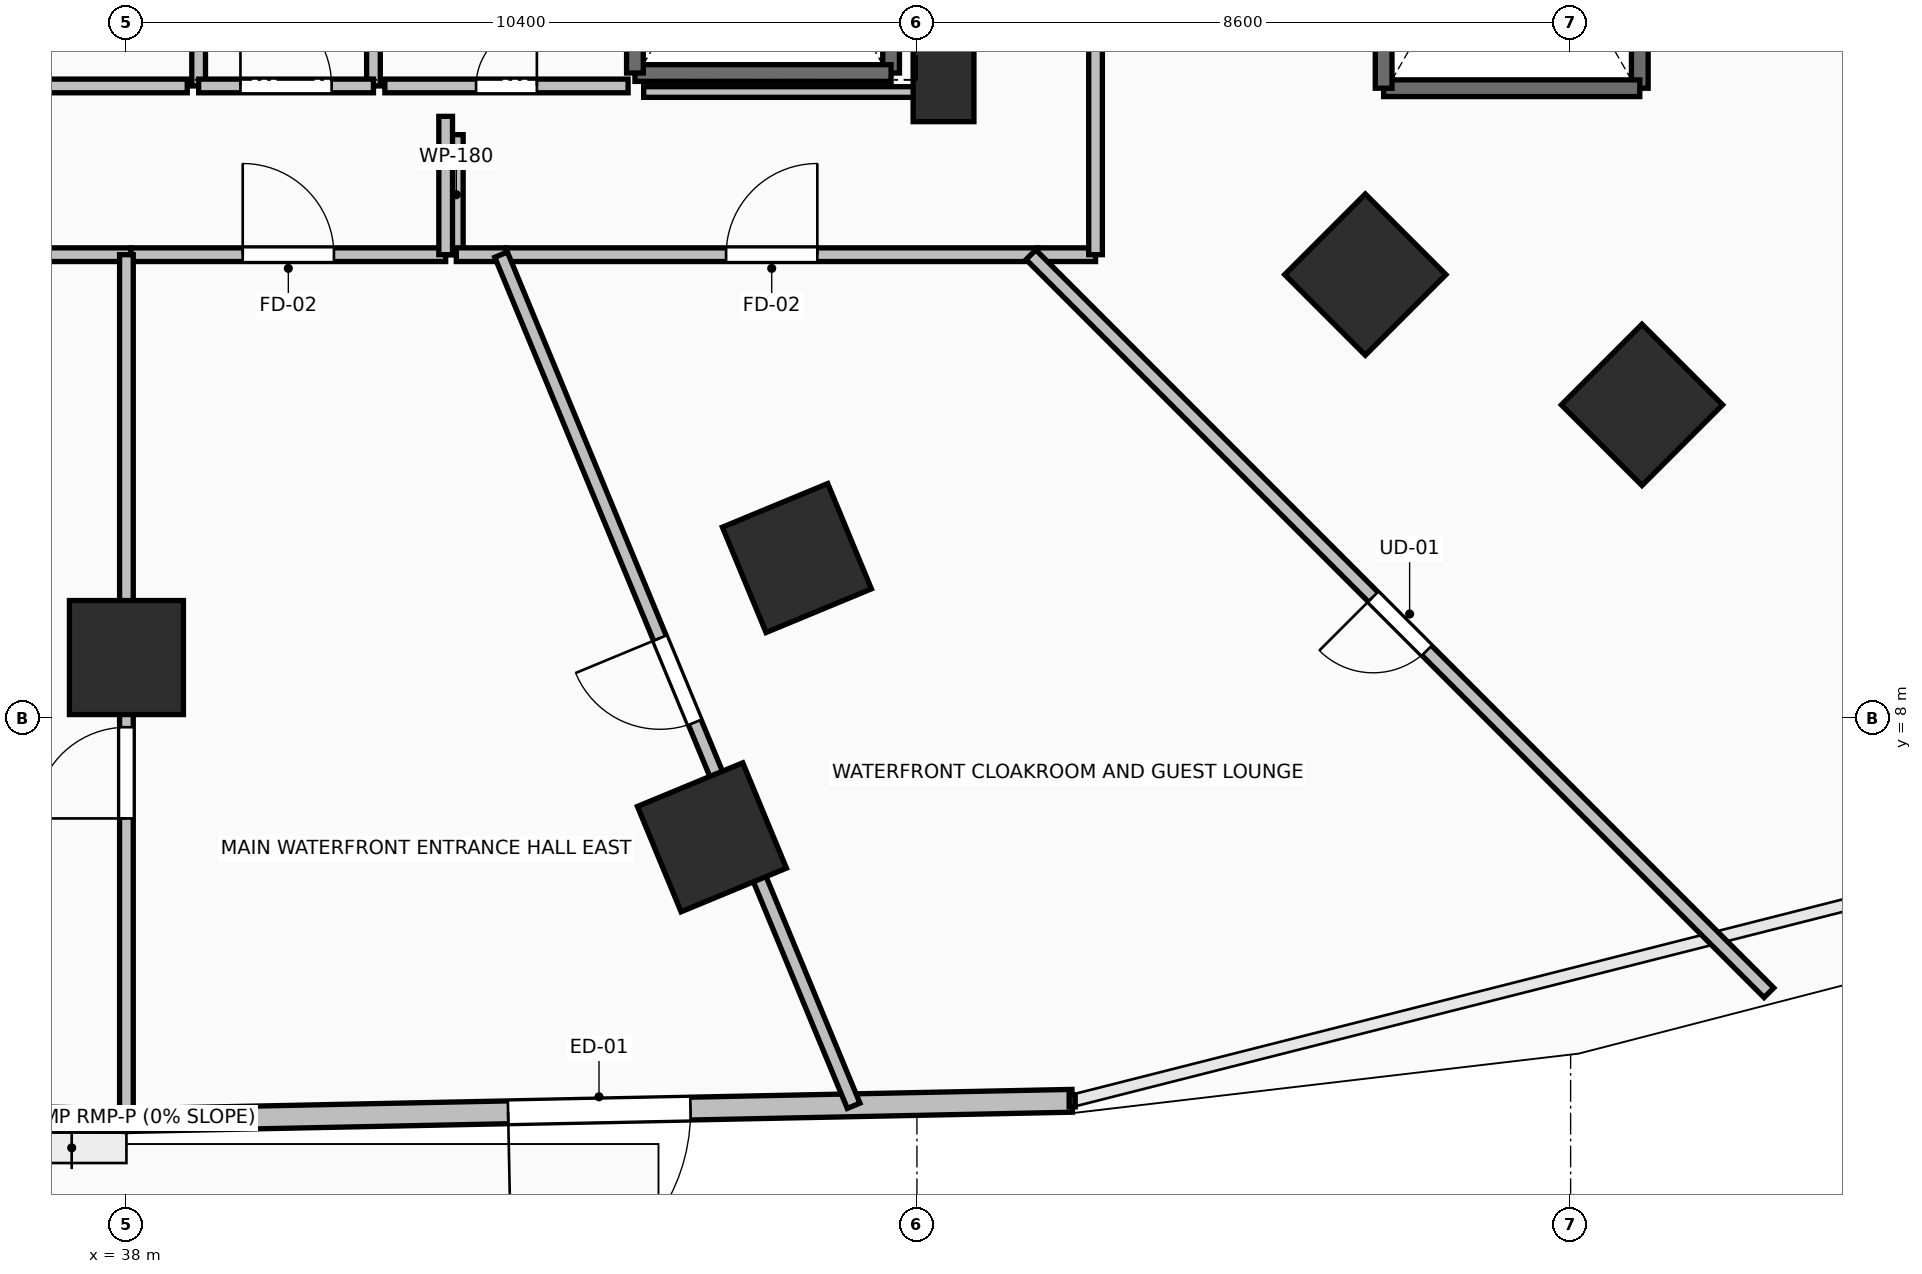
"""IFC4 building model, lengths in metres.
Left out: names, types, materials, properties, quantities, classifications, styles, units other than length and angle.
Written with IfcOpenShell. Run it as: python <this file> out.ifc"""

import sys

from ifc_helpers import new_model, si_unit, direction, frame, frame_2d, origin, origin_2d, place, context, subcontext, project, spatial, rectangle, extrude, element, fill, save


model = new_model("IFC4")
c1 = context("Model", 3, precision=1e-05, world=origin(), true_north=direction((0.0, 1.0)))
c2 = subcontext(c1, "Body", "Model", "MODEL_VIEW")
j1 = project(units=[si_unit("LENGTHUNIT", "METRE"), si_unit("PLANEANGLEUNIT", "RADIAN")], contexts=[c1])
p1 = place(None, origin())
s1 = spatial("IfcSite", under=j1, at=p1, CompositionType="ELEMENT")
p2 = place(p1, origin())
s2 = spatial("IfcBuilding", under=s1, at=p2, CompositionType="ELEMENT")
p3 = place(p2, origin())
s3 = spatial("IfcBuildingStorey", under=s2, at=p3, CompositionType="ELEMENT", Elevation=0.0)
for number, where, z_axis, x_axis in (
    (1, (38.0, 8.8, 0.0), (0.0, 0.0, 1.0), (0.0, -1.0, 0.0)),
    (2, (46.821, 10.109, 0.0), (0.0, 0.0, 1.0), (0.383, -0.924, 0.0)),
    (3, (54.299, 13.838, 0.0), (0.0, 0.0, 1.0), (0.707, -0.707, 0.0)),
    (4, (45.703, 6.435, 0.0), (0.0, 0.0, 1.0), (0.383, -0.924, 0.0)),
    (5, (57.939, 12.124, 0.0), (0.0, 0.0, 1.0), (0.707, -0.707, 0.0)),
):
    element("IfcColumn", number, at=place(p3, frame(where, z_axis=z_axis, x_axis=x_axis)), inside=s3, PredefinedType="COLUMN", context=c2, shape_type="SweptSolid", body=[
        extrude(rectangle(XDim=1.5, YDim=1.5, at=origin_2d()), origin(), (0.0, 0.0, 1.0), 4.8),
    ])
p4 = place(p3, frame((48.75, 16.45, 0.0), z_axis=(0.0, 0.0, 1.0), x_axis=(1.0, 0.0, 0.0)))
e6 = element("IfcColumn", 6, at=p4, inside=s3, PredefinedType="PILASTER", context=c2, shape_type="SweptSolid", body=[
    extrude(rectangle(XDim=0.8, YDim=1.2, at=origin_2d()), origin(), (0.0, 0.0, 1.0), 4.8),
])
p5 = place(p3, frame((25.558, 2.969, 0.0), z_axis=(0.0, 0.0, 1.0), x_axis=(0.999791851131, -0.020402313892, 0.0)))
e7 = element("IfcWall", 7, at=p5, inside=s3, PredefinedType="STANDARD", context=c2, shape_type="SweptSolid", body=[
    extrude(rectangle(XDim=12.445, YDim=0.3, at=frame_2d((6.223, 0.0))), origin(), (0.0, 0.0, 1.0), 4.48),
])
p6 = place(p5, frame((5.022, 0.0, 0.0)))
e8 = element("IfcOpeningElement", 8, at=p6, cuts=e7, PredefinedType="OPENING", context=c2, shape_type="SweptSolid", body=[
    extrude(rectangle(XDim=2.4, YDim=2.8, at=frame_2d((1.2, 1.4))), frame((0.0, 0.165, 0.0), z_axis=(0.0, -1.0, 0.0), x_axis=(1.0, 0.0, 0.0)), (0.0, 0.0, 1.0), 0.33),
])
p7 = place(p3, frame((38.0, 2.715, 0.0), z_axis=(0.0, 0.0, 1.0), x_axis=(0.999791851131, 0.020402313892, 0.0)))
e9 = element("IfcWall", 9, at=p7, inside=s3, PredefinedType="STANDARD", context=c2, shape_type="SweptSolid", body=[
    extrude(rectangle(XDim=12.445, YDim=0.3, at=frame_2d((6.223, 0.0))), origin(), (0.0, 0.0, 1.0), 4.48),
])
p8 = place(p7, frame((5.022, 0.0, 0.0)))
e10 = element("IfcOpeningElement", 10, at=p8, cuts=e9, PredefinedType="OPENING", context=c2, shape_type="SweptSolid", body=[
    extrude(rectangle(XDim=2.4, YDim=2.8, at=frame_2d((1.2, 1.4))), frame((0.0, 0.165, 0.0), z_axis=(0.0, -1.0, 0.0), x_axis=(1.0, 0.0, 0.0)), (0.0, 0.0, 1.0), 0.33),
])
p9 = place(p3, frame((48.06, 23.91, 0.0), z_axis=(0.0, 0.0, 1.0), x_axis=(0.0, -1.0, 0.0)))
e11 = element("IfcWall", 11, at=p9, inside=s3, PredefinedType="SOLIDWALL", context=c2, shape_type="SweptSolid", body=[
    extrude(rectangle(XDim=7.42, YDim=0.22, at=frame_2d((3.71, 0.0))), origin(), (0.0, 0.0, 1.0), 4.48),
])
p10 = place(p3, frame((48.06, 16.49, 0.0), z_axis=(0.0, 0.0, 1.0), x_axis=(-1.0, 0.0, 0.0)))
e12 = element("IfcWall", 12, at=p10, inside=s3, PredefinedType="SOLIDWALL", context=c2, shape_type="SweptSolid", body=[
    extrude(rectangle(XDim=3.37, YDim=0.22, at=frame_2d((1.685, 0.0))), origin(), (0.0, 0.0, 1.0), 4.48),
])
for number, where, z_axis, x_axis in (
    (13, (44.69, 16.49, 0.0), (0.0, 0.0, 1.0), (0.0, 1.0, 0.0)),
    (14, (57.91, 23.71, 0.0), (0.0, 0.0, 1.0), (0.0, -1.0, 0.0)),
):
    element("IfcWall", number, at=place(p3, frame(where, z_axis=z_axis, x_axis=x_axis)), inside=s3, PredefinedType="SOLIDWALL", context=c2, shape_type="SweptSolid", body=[
        extrude(rectangle(XDim=7.42, YDim=0.22, at=frame_2d((3.71, 0.0))), origin(), (0.0, 0.0, 1.0), 4.48),
    ])
p11 = place(p3, frame((57.91, 16.29, 0.0), z_axis=(0.0, 0.0, 1.0), x_axis=(-1.0, 0.0, 0.0)))
e15 = element("IfcWall", 15, at=p11, inside=s3, PredefinedType="SOLIDWALL", context=c2, shape_type="SweptSolid", body=[
    extrude(rectangle(XDim=3.37, YDim=0.22, at=frame_2d((1.685, 0.0))), origin(), (0.0, 0.0, 1.0), 4.48),
])
p12 = place(p3, frame((54.54, 16.29, 0.0), z_axis=(0.0, 0.0, 1.0), x_axis=(0.0, 1.0, 0.0)))
e16 = element("IfcWall", 16, at=p12, inside=s3, PredefinedType="SOLIDWALL", context=c2, shape_type="SweptSolid", body=[
    extrude(rectangle(XDim=7.42, YDim=0.22, at=frame_2d((3.71, 0.0))), origin(), (0.0, 0.0, 1.0), 4.48),
])
p13 = place(p3, frame((41.25, 16.32, 0.0), z_axis=(0.0, 0.0, 1.0), x_axis=(0.0, 1.0, 0.0)))
e17 = element("IfcWall", 17, at=p13, inside=s3, PredefinedType="PARTITIONING", context=c2, shape_type="SweptSolid", body=[
    extrude(rectangle(XDim=3.985, YDim=0.18, at=frame_2d((1.992, 0.0))), origin(), (0.0, 0.0, 1.0), 4.48),
])
p14 = place(p13, frame((1.593, 0.0, 0.0)))
e18 = element("IfcOpeningElement", 18, at=p14, cuts=e17, PredefinedType="OPENING", context=c2, shape_type="SweptSolid", body=[
    extrude(rectangle(XDim=0.8, YDim=2.05, at=frame_2d((0.4, 1.025))), frame((0.0, 0.105, 0.0), z_axis=(0.0, -1.0, 0.0), x_axis=(1.0, 0.0, 0.0)), (0.0, 0.0, 1.0), 0.21),
])
p15 = place(p3, frame((38.95, 21.755, 0.0), z_axis=(0.0, 0.0, 1.0), x_axis=(0.0, -1.0, 0.0)))
e19 = element("IfcWall", 19, at=p15, inside=s3, PredefinedType="PARTITIONING", context=c2, shape_type="SweptSolid", body=[
    extrude(rectangle(XDim=5.435, YDim=0.18, at=frame_2d((2.717, 0.0))), origin(), (0.0, 0.0, 1.0), 4.48),
])
p16 = place(p15, frame((2.292, 0.0, 0.0)))
e20 = element("IfcOpeningElement", 20, at=p16, cuts=e19, PredefinedType="OPENING", context=c2, shape_type="SweptSolid", body=[
    extrude(rectangle(XDim=0.85, YDim=2.1, at=frame_2d((0.425, 1.05))), frame((0.0, 0.105, 0.0), z_axis=(0.0, -1.0, 0.0), x_axis=(1.0, 0.0, 0.0)), (0.0, 0.0, 1.0), 0.21),
])
p17 = place(p3, frame((38.95, 16.32, 0.0), z_axis=(0.0, 0.0, 1.0), x_axis=(1.0, 0.0, 0.0)))
e21 = element("IfcWall", 21, at=p17, inside=s3, PredefinedType="PARTITIONING", context=c2, shape_type="SweptSolid", body=[
    extrude(rectangle(XDim=2.3, YDim=0.18, at=frame_2d((1.15, 0.0))), origin(), (0.0, 0.0, 1.0), 4.48),
])
p18 = place(p17, frame((0.55, 0.0, 0.0)))
e22 = element("IfcOpeningElement", 22, at=p18, cuts=e21, PredefinedType="OPENING", context=c2, shape_type="SweptSolid", body=[
    extrude(rectangle(XDim=1.2, YDim=2.15, at=frame_2d((0.6, 1.075))), frame((0.0, 0.105, 0.0), z_axis=(0.0, -1.0, 0.0), x_axis=(1.0, 0.0, 0.0)), (0.0, 0.0, 1.0), 0.21),
])
p19 = place(p3, frame((41.4, 16.32, 0.0), z_axis=(0.0, 0.0, 1.0), x_axis=(1.0, 0.0, 0.0)))
e23 = element("IfcWall", 23, at=p19, inside=s3, PredefinedType="PARTITIONING", context=c2, shape_type="SweptSolid", body=[
    extrude(rectangle(XDim=3.2, YDim=0.18, at=frame_2d((1.6, 0.0))), origin(), (0.0, 0.0, 1.0), 4.48),
])
p20 = place(p19, frame((1.2, 0.0, 0.0)))
e24 = element("IfcOpeningElement", 24, at=p20, cuts=e23, PredefinedType="OPENING", context=c2, shape_type="SweptSolid", body=[
    extrude(rectangle(XDim=0.8, YDim=2.05, at=frame_2d((0.4, 1.025))), frame((0.0, 0.105, 0.0), z_axis=(0.0, -1.0, 0.0), x_axis=(1.0, 0.0, 0.0)), (0.0, 0.0, 1.0), 0.21),
])
p21 = place(p3, frame((31.4, 16.32, 0.0), z_axis=(0.0, 0.0, 1.0), x_axis=(1.0, 0.0, 0.0)))
e25 = element("IfcWall", 25, at=p21, inside=s3, PredefinedType="PARTITIONING", context=c2, shape_type="SweptSolid", body=[
    extrude(rectangle(XDim=7.4, YDim=0.18, at=frame_2d((3.7, 0.0))), origin(), (0.0, 0.0, 1.0), 4.48),
])
p22 = place(p21, frame((3.275, 0.0, 0.0)))
e26 = element("IfcOpeningElement", 26, at=p22, cuts=e25, PredefinedType="OPENING", context=c2, shape_type="SweptSolid", body=[
    extrude(rectangle(XDim=0.85, YDim=2.1, at=frame_2d((0.425, 1.05))), frame((0.0, 0.105, 0.0), z_axis=(0.0, -1.0, 0.0), x_axis=(1.0, 0.0, 0.0)), (0.0, 0.0, 1.0), 0.21),
])
p23 = place(p3, frame((33.131, 14.1, 0.0), z_axis=(0.0, 0.0, 1.0), x_axis=(1.0, 0.0, 0.0)))
e27 = element("IfcWall", 27, at=p23, inside=s3, PredefinedType="PARTITIONING", context=c2, shape_type="SweptSolid", body=[
    extrude(rectangle(XDim=4.929, YDim=0.18, at=frame_2d((2.464, 0.0))), origin(), (0.0, 0.0, 1.0), 4.48),
])
p24 = place(p23, frame((1.865, 0.0, 0.0)))
e28 = element("IfcOpeningElement", 28, at=p24, cuts=e27, PredefinedType="OPENING", context=c2, shape_type="SweptSolid", body=[
    extrude(rectangle(XDim=1.2, YDim=2.15, at=frame_2d((0.6, 1.075))), frame((0.0, 0.105, 0.0), z_axis=(0.0, -1.0, 0.0), x_axis=(1.0, 0.0, 0.0)), (0.0, 0.0, 1.0), 0.21),
])
p25 = place(p3, frame((42.34, 15.679, 0.0), z_axis=(0.0, 0.0, 1.0), x_axis=(0.0, -1.0, 0.0)))
e29 = element("IfcWall", 29, at=p25, inside=s3, PredefinedType="PARTITIONING", context=c2, shape_type="SweptSolid", body=[
    extrude(rectangle(XDim=1.579, YDim=0.18, at=frame_2d((0.79, 0.0))), origin(), (0.0, 0.0, 1.0), 4.48),
])
p26 = place(p3, frame((42.34, 14.1, 0.0), z_axis=(0.0, 0.0, 1.0), x_axis=(1.0, 0.0, 0.0)))
e30 = element("IfcWall", 30, at=p26, inside=s3, PredefinedType="PARTITIONING", context=c2, shape_type="SweptSolid", body=[
    extrude(rectangle(XDim=0.654, YDim=0.18, at=frame_2d((0.327, 0.0))), origin(), (0.0, 0.0, 1.0), 4.48),
])
p27 = place(p3, frame((38.06, 14.1, 0.0), z_axis=(0.0, 0.0, 1.0), x_axis=(1.0, 0.0, 0.0)))
e31 = element("IfcWall", 31, at=p27, inside=s3, PredefinedType="PARTITIONING", context=c2, shape_type="SweptSolid", body=[
    extrude(rectangle(XDim=4.14, YDim=0.18, at=frame_2d((2.07, 0.0))), origin(), (0.0, 0.0, 1.0), 4.48),
])
p28 = place(p27, frame((1.47, 0.0, 0.0)))
e32 = element("IfcOpeningElement", 32, at=p28, cuts=e31, PredefinedType="OPENING", context=c2, shape_type="SweptSolid", body=[
    extrude(rectangle(XDim=1.2, YDim=2.15, at=frame_2d((0.6, 1.075))), frame((0.0, 0.105, 0.0), z_axis=(0.0, -1.0, 0.0), x_axis=(1.0, 0.0, 0.0)), (0.0, 0.0, 1.0), 0.21),
])
p29 = place(p3, frame((42.2, 14.1, 0.0), z_axis=(0.0, 0.0, 1.0), x_axis=(0.0, 1.0, 0.0)))
e33 = element("IfcWall", 33, at=p29, inside=s3, PredefinedType="PARTITIONING", context=c2, shape_type="SweptSolid", body=[
    extrude(rectangle(XDim=1.82, YDim=0.18, at=frame_2d((0.91, 0.0))), origin(), (0.0, 0.0, 1.0), 4.48),
])
p30 = place(p3, frame((42.994, 14.1, 0.0), z_axis=(0.0, 0.0, 1.0), x_axis=(1.0, 0.0, 0.0)))
e34 = element("IfcWall", 34, at=p30, inside=s3, PredefinedType="PARTITIONING", context=c2, shape_type="SweptSolid", body=[
    extrude(rectangle(XDim=6.991, YDim=0.18, at=frame_2d((3.496, 0.0))), origin(), (0.0, 0.0, 1.0), 3.672),
])
p31 = place(p30, frame((2.896, 0.0, 0.0)))
e35 = element("IfcOpeningElement", 35, at=p31, cuts=e34, PredefinedType="OPENING", context=c2, shape_type="SweptSolid", body=[
    extrude(rectangle(XDim=1.2, YDim=2.15, at=frame_2d((0.6, 1.075))), frame((0.0, 0.105, 0.0), z_axis=(0.0, -1.0, 0.0), x_axis=(1.0, 0.0, 0.0)), (0.0, 0.0, 1.0), 0.21),
])
p32 = place(p3, frame((49.985, 14.1, 0.0), z_axis=(0.0, 0.0, 1.0), x_axis=(1.0, 0.0, 0.0)))
e36 = element("IfcWall", 36, at=p32, inside=s3, PredefinedType="PARTITIONING", context=c2, shape_type="SweptSolid", body=[
    extrude(rectangle(XDim=0.765, YDim=0.18, at=frame_2d((0.382, 0.0))), origin(), (0.0, 0.0, 1.0), 4.212),
])
p33 = place(p3, frame((50.75, 14.1, 0.0), z_axis=(0.0, 0.0, 1.0), x_axis=(0.0, 1.0, 0.0)))
e37 = element("IfcWall", 37, at=p33, inside=s3, PredefinedType="PARTITIONING", context=c2, shape_type="SweptSolid", body=[
    extrude(rectangle(XDim=11.96, YDim=0.18, at=frame_2d((5.98, 0.0))), origin(), (0.0, 0.0, 1.0), 3.672),
])
p34 = place(p33, frame((5.48, 0.0, 0.0)))
e38 = element("IfcOpeningElement", 38, at=p34, cuts=e37, PredefinedType="OPENING", context=c2, shape_type="SweptSolid", body=[
    extrude(rectangle(XDim=1.0, YDim=2.15, at=frame_2d((0.5, 1.075))), frame((0.0, 0.105, 0.0), z_axis=(0.0, -1.0, 0.0), x_axis=(1.0, 0.0, 0.0)), (0.0, 0.0, 1.0), 0.21),
])
p35 = place(p3, frame((38.0, 2.707, 0.0), z_axis=(0.0, 0.0, 1.0), x_axis=(0.0, 1.0, 0.0)))
e39 = element("IfcWall", 39, at=p35, inside=s3, PredefinedType="PARTITIONING", context=c2, shape_type="SweptSolid", body=[
    extrude(rectangle(XDim=11.393, YDim=0.18, at=frame_2d((5.697, 0.0))), origin(), (0.0, 0.0, 1.0), 3.672),
])
p36 = place(p35, frame((3.977, 0.0, 0.0)))
e40 = element("IfcOpeningElement", 40, at=p36, cuts=e39, PredefinedType="OPENING", context=c2, shape_type="SweptSolid", body=[
    extrude(rectangle(XDim=1.2, YDim=2.15, at=frame_2d((0.6, 1.075))), frame((0.0, 0.105, 0.0), z_axis=(0.0, -1.0, 0.0), x_axis=(1.0, 0.0, 0.0)), (0.0, 0.0, 1.0), 0.21),
])
p37 = place(p3, frame((47.567, 2.903, 0.0), z_axis=(0.0, 0.0, 1.0), x_axis=(-0.382682115092, 0.923880078142, 0.0)))
e41 = element("IfcWall", 41, at=p37, inside=s3, PredefinedType="PARTITIONING", context=c2, shape_type="SweptSolid", body=[
    extrude(rectangle(XDim=12.12, YDim=0.18, at=frame_2d((6.06, 0.0))), origin(), (0.0, 0.0, 1.0), 3.672),
])
p38 = place(p37, frame((5.46, 0.0, 0.0)))
e42 = element("IfcOpeningElement", 42, at=p38, cuts=e41, PredefinedType="OPENING", context=c2, shape_type="SweptSolid", body=[
    extrude(rectangle(XDim=1.2, YDim=2.15, at=frame_2d((0.6, 1.075))), frame((0.0, 0.105, 0.0), z_axis=(0.0, -1.0, 0.0), x_axis=(1.0, 0.0, 0.0)), (0.0, 0.0, 1.0), 0.21),
])
p39 = place(p3, frame((59.609, 4.391, 0.0), z_axis=(0.0, 0.0, 1.0), x_axis=(-0.707106781187, 0.707106781187, 0.0)))
e43 = element("IfcWall", 43, at=p39, inside=s3, PredefinedType="PARTITIONING", context=c2, shape_type="SweptSolid", body=[
    extrude(rectangle(XDim=13.73, YDim=0.18, at=frame_2d((6.865, 0.0))), origin(), (0.0, 0.0, 1.0), 3.769),
])
p40 = place(p39, frame((6.365, 0.0, 0.0)))
e44 = element("IfcOpeningElement", 44, at=p40, cuts=e43, PredefinedType="OPENING", context=c2, shape_type="SweptSolid", body=[
    extrude(rectangle(XDim=1.0, YDim=2.15, at=frame_2d((0.5, 1.075))), frame((0.0, 0.105, 0.0), z_axis=(0.0, -1.0, 0.0), x_axis=(1.0, 0.0, 0.0)), (0.0, 0.0, 1.0), 0.21),
])
p41 = place(p3, frame((48.55, 23.754, 0.0), z_axis=(0.0, 0.0, 1.0), x_axis=(0.0, -1.0, 0.0)))
e45 = element("IfcWall", 45, at=p41, inside=s3, PredefinedType="PARTITIONING", context=c2, shape_type="SweptSolid", body=[
    extrude(rectangle(XDim=7.514, YDim=0.14, at=frame_2d((3.757, 0.0))), origin(), (0.0, 0.0, 1.0), 2.406),
])
p42 = place(p3, frame((48.55, 16.24, 0.0), z_axis=(0.0, 0.0, 1.0), x_axis=(-1.0, 0.0, 0.0)))
e46 = element("IfcWall", 46, at=p42, inside=s3, PredefinedType="PARTITIONING", context=c2, shape_type="SweptSolid", body=[
    extrude(rectangle(XDim=3.745, YDim=0.14, at=frame_2d((1.873, 0.0))), origin(), (0.0, 0.0, 1.0), 3.672),
])
p43 = place(p8, frame((2.4, 0.0, 0.0), z_axis=(0.0, 0.0, 1.0), x_axis=(-1.0, 0.0, 0.0)))
e47 = element("IfcDoor", 47, at=p43, inside=s3, OperationType="DOUBLE_SWING_LEFT", PredefinedType="DOOR", context=c2, shape_type="SweptSolid", body=[
    extrude(rectangle(XDim=2.4, YDim=2.8, at=frame_2d((1.2, 1.4))), frame((0.0, 0.025, 0.0), z_axis=(0.0, -1.0, 0.0), x_axis=(1.0, 0.0, 0.0)), (0.0, 0.0, 1.0), 0.05),
])
fill(e10, e47)
p44 = place(p18, origin())
e48 = element("IfcDoor", 48, at=p44, inside=s3, OperationType="SINGLE_SWING_LEFT", PredefinedType="DOOR", context=c2, shape_type="SweptSolid", body=[
    extrude(rectangle(XDim=1.2, YDim=2.15, at=frame_2d((0.6, 1.075))), frame((0.0, 0.025, 0.0), z_axis=(0.0, -1.0, 0.0), x_axis=(1.0, 0.0, 0.0)), (0.0, 0.0, 1.0), 0.05),
])
fill(e22, e48)
p45 = place(p20, origin())
e49 = element("IfcDoor", 49, at=p45, inside=s3, OperationType="SINGLE_SWING_RIGHT", PredefinedType="DOOR", context=c2, shape_type="SweptSolid", body=[
    extrude(rectangle(XDim=0.8, YDim=2.05, at=frame_2d((0.4, 1.025))), frame((0.0, 0.025, 0.0), z_axis=(0.0, -1.0, 0.0), x_axis=(1.0, 0.0, 0.0)), (0.0, 0.0, 1.0), 0.05),
])
fill(e24, e49)
p46 = place(p28, origin())
e50 = element("IfcDoor", 50, at=p46, inside=s3, OperationType="SINGLE_SWING_LEFT", PredefinedType="DOOR", context=c2, shape_type="SweptSolid", body=[
    extrude(rectangle(XDim=1.2, YDim=2.15, at=frame_2d((0.6, 1.075))), frame((0.0, 0.025, 0.0), z_axis=(0.0, -1.0, 0.0), x_axis=(1.0, 0.0, 0.0)), (0.0, 0.0, 1.0), 0.05),
])
fill(e32, e50)
p47 = place(p31, origin())
e51 = element("IfcDoor", 51, at=p47, inside=s3, OperationType="SINGLE_SWING_RIGHT", PredefinedType="DOOR", context=c2, shape_type="SweptSolid", body=[
    extrude(rectangle(XDim=1.2, YDim=2.15, at=frame_2d((0.6, 1.075))), frame((0.0, 0.025, 0.0), z_axis=(0.0, -1.0, 0.0), x_axis=(1.0, 0.0, 0.0)), (0.0, 0.0, 1.0), 0.05),
])
fill(e35, e51)
p48 = place(p36, origin())
e52 = element("IfcDoor", 52, at=p48, inside=s3, OperationType="SINGLE_SWING_LEFT", PredefinedType="DOOR", context=c2, shape_type="SweptSolid", body=[
    extrude(rectangle(XDim=1.2, YDim=2.15, at=frame_2d((0.6, 1.075))), frame((0.0, 0.025, 0.0), z_axis=(0.0, -1.0, 0.0), x_axis=(1.0, 0.0, 0.0)), (0.0, 0.0, 1.0), 0.05),
])
fill(e40, e52)
p49 = place(p38, origin())
e53 = element("IfcDoor", 53, at=p49, inside=s3, OperationType="SINGLE_SWING_RIGHT", PredefinedType="DOOR", context=c2, shape_type="SweptSolid", body=[
    extrude(rectangle(XDim=1.2, YDim=2.15, at=frame_2d((0.6, 1.075))), frame((0.0, 0.025, 0.0), z_axis=(0.0, -1.0, 0.0), x_axis=(1.0, 0.0, 0.0)), (0.0, 0.0, 1.0), 0.05),
])
fill(e42, e53)
p50 = place(p40, origin())
e54 = element("IfcDoor", 54, at=p50, inside=s3, OperationType="SINGLE_SWING_RIGHT", PredefinedType="DOOR", context=c2, shape_type="SweptSolid", body=[
    extrude(rectangle(XDim=1.0, YDim=2.15, at=frame_2d((0.5, 1.075))), frame((0.0, 0.025, 0.0), z_axis=(0.0, -1.0, 0.0), x_axis=(1.0, 0.0, 0.0)), (0.0, 0.0, 1.0), 0.05),
])
fill(e44, e54)
save(model, sys.argv[1])
